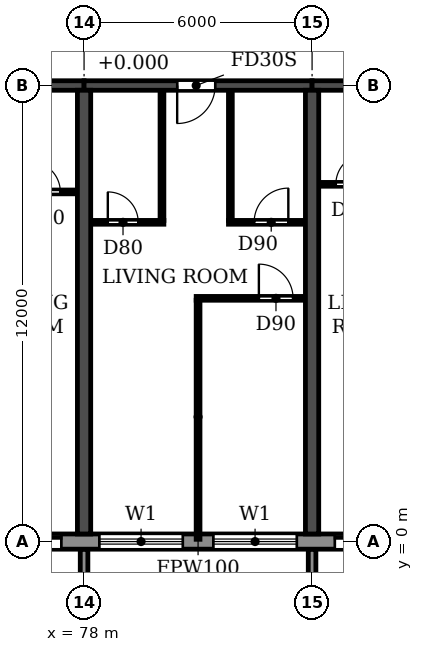
"""IFC4 building model, lengths in metres.
Left out: names, types, materials, properties, quantities, classifications, styles, units other than length and angle.
Written with IfcOpenShell. Run it as: python <this file> out.ifc"""

import sys

from ifc_helpers import new_model, si_unit, direction, frame, frame_2d, origin, place, context, subcontext, project, spatial, polyline, rectangle, outline, extrude, source, transform, mapped, element, fill, save


model = new_model("IFC4")
c1 = context("Model", 3, precision=1e-05, world=origin(), true_north=direction((0.0, 1.0)))
c2 = subcontext(c1, "Body", "Model", "MODEL_VIEW")
j1 = project(units=[si_unit("LENGTHUNIT", "METRE"), si_unit("PLANEANGLEUNIT", "RADIAN")], contexts=[c1])
p1 = place(None, origin())
s1 = spatial("IfcSite", under=j1, at=p1, CompositionType="ELEMENT")
p2 = place(p1, origin())
s2 = spatial("IfcBuilding", under=s1, at=p2, CompositionType="ELEMENT")
p3 = place(p2, frame((0.0, 0.0, 82.8)))
s3 = spatial("IfcBuildingStorey", under=s2, at=p3, CompositionType="ELEMENT", Elevation=82.8)
for number, where, z_axis, x_axis in (
    (1, (78.0, 0.2, 0.0), (0.0, 0.0, 1.0), (0.0, 1.0, 0.0)),
    (2, (84.0, 0.2, 0.0), (0.0, 0.0, 1.0), (0.0, 1.0, 0.0)),
):
    element("IfcWall", number, at=place(p3, frame(where, z_axis=z_axis, x_axis=x_axis)), inside=s3, PredefinedType="SHEAR", context=c2, shape_type="SweptSolid", body=[
        extrude(rectangle(XDim=11.675, YDim=0.35, at=frame_2d((5.837, 0.0))), origin(), (0.0, 0.0, 1.0), 3.06),
    ])
p4 = place(p3, frame((72.0, 12.0, 0.0), z_axis=(0.0, 0.0, 1.0), x_axis=(1.0, 0.0, 0.0)))
e3 = element("IfcWall", 3, at=p4, inside=s3, PredefinedType="SHEAR", context=c2, shape_type="SweptSolid", body=[
    extrude(rectangle(XDim=6.0, YDim=0.25, at=frame_2d((3.0, 0.0))), origin(), (0.0, 0.0, 1.0), 2.46),
])
p5 = place(p4, frame((2.55, 0.0, 0.0)))
e4 = element("IfcOpeningElement", 4, at=p5, cuts=e3, PredefinedType="OPENING", context=c2, shape_type="SweptSolid", body=[
    extrude(rectangle(XDim=1.0, YDim=2.1, at=frame_2d((0.5, 1.05))), frame((0.0, 0.135, 0.0), z_axis=(0.0, -1.0, 0.0), x_axis=(1.0, 0.0, 0.0)), (0.0, 0.0, 1.0), 0.27),
])
p6 = place(p3, frame((78.0, 12.0, 0.0), z_axis=(0.0, 0.0, 1.0), x_axis=(1.0, 0.0, 0.0)))
e5 = element("IfcWall", 5, at=p6, inside=s3, PredefinedType="SHEAR", context=c2, shape_type="SweptSolid", body=[
    extrude(rectangle(XDim=6.0, YDim=0.25, at=frame_2d((3.0, 0.0))), origin(), (0.0, 0.0, 1.0), 2.46),
])
p7 = place(p6, frame((2.45, 0.0, 0.0)))
e6 = element("IfcOpeningElement", 6, at=p7, cuts=e5, PredefinedType="OPENING", context=c2, shape_type="SweptSolid", body=[
    extrude(rectangle(XDim=1.0, YDim=2.1, at=frame_2d((0.5, 1.05))), frame((0.0, 0.135, 0.0), z_axis=(0.0, -1.0, 0.0), x_axis=(1.0, 0.0, 0.0)), (0.0, 0.0, 1.0), 0.27),
])
p8 = place(p3, frame((84.0, 12.0, 0.0), z_axis=(0.0, 0.0, 1.0), x_axis=(1.0, 0.0, 0.0)))
e7 = element("IfcWall", 7, at=p8, inside=s3, PredefinedType="SHEAR", context=c2, shape_type="SweptSolid", body=[
    extrude(rectangle(XDim=6.0, YDim=0.25, at=frame_2d((3.0, 0.0))), origin(), (0.0, 0.0, 1.0), 2.46),
])
p9 = place(p8, frame((2.45, 0.0, 0.0)))
e8 = element("IfcOpeningElement", 8, at=p9, cuts=e7, PredefinedType="OPENING", context=c2, shape_type="SweptSolid", body=[
    extrude(rectangle(XDim=1.0, YDim=2.1, at=frame_2d((0.5, 1.05))), frame((0.0, 0.135, 0.0), z_axis=(0.0, -1.0, 0.0), x_axis=(1.0, 0.0, 0.0)), (0.0, 0.0, 1.0), 0.27),
])
p10 = place(p3, frame((10.683, 0.0, 0.0), z_axis=(0.0, 0.0, 1.0), x_axis=(1.0, 0.0, 0.0)))
e9 = element("IfcWall", 9, at=p10, inside=s3, PredefinedType="STANDARD", context=c2, shape_type="SweptSolid", body=[
    extrude(rectangle(XDim=80.634, YDim=0.4, at=frame_2d((40.317, 0.0))), origin(), (0.0, 0.0, 1.0), 3.06),
])
p11 = place(p10, frame((1.717, 0.0, 0.9)))
e10 = element("IfcOpeningElement", 10, at=p11, cuts=e9, PredefinedType="OPENING", context=c2, shape_type="SweptSolid", body=[
    extrude(rectangle(XDim=2.2, YDim=1.5, at=frame_2d((1.1, 0.75))), frame((0.0, 0.21, 0.0), z_axis=(0.0, -1.0, 0.0), x_axis=(1.0, 0.0, 0.0)), (0.0, 0.0, 1.0), 0.42),
])
p12 = place(p10, frame((4.917, 0.0, 0.0)))
e11 = element("IfcOpeningElement", 11, at=p12, cuts=e9, PredefinedType="OPENING", context=c2, shape_type="SweptSolid", body=[
    extrude(rectangle(XDim=1.8, YDim=2.4, at=frame_2d((0.9, 1.2))), frame((0.0, 0.21, 0.0), z_axis=(0.0, -1.0, 0.0), x_axis=(1.0, 0.0, 0.0)), (0.0, 0.0, 1.0), 0.42),
])
p13 = place(p10, frame((7.717, 0.0, 0.9)))
e12 = element("IfcOpeningElement", 12, at=p13, cuts=e9, PredefinedType="OPENING", context=c2, shape_type="SweptSolid", body=[
    extrude(rectangle(XDim=2.2, YDim=1.5, at=frame_2d((1.1, 0.75))), frame((0.0, 0.21, 0.0), z_axis=(0.0, -1.0, 0.0), x_axis=(1.0, 0.0, 0.0)), (0.0, 0.0, 1.0), 0.42),
])
p14 = place(p10, frame((10.717, 0.0, 0.9)))
e13 = element("IfcOpeningElement", 13, at=p14, cuts=e9, PredefinedType="OPENING", context=c2, shape_type="SweptSolid", body=[
    extrude(rectangle(XDim=2.2, YDim=1.5, at=frame_2d((1.1, 0.75))), frame((0.0, 0.21, 0.0), z_axis=(0.0, -1.0, 0.0), x_axis=(1.0, 0.0, 0.0)), (0.0, 0.0, 1.0), 0.42),
])
p15 = place(p10, frame((13.917, 0.0, 0.0)))
e14 = element("IfcOpeningElement", 14, at=p15, cuts=e9, PredefinedType="OPENING", context=c2, shape_type="SweptSolid", body=[
    extrude(rectangle(XDim=1.8, YDim=2.4, at=frame_2d((0.9, 1.2))), frame((0.0, 0.21, 0.0), z_axis=(0.0, -1.0, 0.0), x_axis=(1.0, 0.0, 0.0)), (0.0, 0.0, 1.0), 0.42),
])
p16 = place(p10, frame((16.717, 0.0, 0.9)))
e15 = element("IfcOpeningElement", 15, at=p16, cuts=e9, PredefinedType="OPENING", context=c2, shape_type="SweptSolid", body=[
    extrude(rectangle(XDim=2.2, YDim=1.5, at=frame_2d((1.1, 0.75))), frame((0.0, 0.21, 0.0), z_axis=(0.0, -1.0, 0.0), x_axis=(1.0, 0.0, 0.0)), (0.0, 0.0, 1.0), 0.42),
])
p17 = place(p10, frame((19.717, 0.0, 0.9)))
e16 = element("IfcOpeningElement", 16, at=p17, cuts=e9, PredefinedType="OPENING", context=c2, shape_type="SweptSolid", body=[
    extrude(rectangle(XDim=2.2, YDim=1.5, at=frame_2d((1.1, 0.75))), frame((0.0, 0.21, 0.0), z_axis=(0.0, -1.0, 0.0), x_axis=(1.0, 0.0, 0.0)), (0.0, 0.0, 1.0), 0.42),
])
p18 = place(p10, frame((22.717, 0.0, 0.9)))
e17 = element("IfcOpeningElement", 17, at=p18, cuts=e9, PredefinedType="OPENING", context=c2, shape_type="SweptSolid", body=[
    extrude(rectangle(XDim=2.2, YDim=1.5, at=frame_2d((1.1, 0.75))), frame((0.0, 0.21, 0.0), z_axis=(0.0, -1.0, 0.0), x_axis=(1.0, 0.0, 0.0)), (0.0, 0.0, 1.0), 0.42),
])
p19 = place(p10, frame((25.917, 0.0, 0.0)))
e18 = element("IfcOpeningElement", 18, at=p19, cuts=e9, PredefinedType="OPENING", context=c2, shape_type="SweptSolid", body=[
    extrude(rectangle(XDim=1.8, YDim=2.4, at=frame_2d((0.9, 1.2))), frame((0.0, 0.21, 0.0), z_axis=(0.0, -1.0, 0.0), x_axis=(1.0, 0.0, 0.0)), (0.0, 0.0, 1.0), 0.42),
])
p20 = place(p10, frame((28.717, 0.0, 0.9)))
e19 = element("IfcOpeningElement", 19, at=p20, cuts=e9, PredefinedType="OPENING", context=c2, shape_type="SweptSolid", body=[
    extrude(rectangle(XDim=2.2, YDim=1.5, at=frame_2d((1.1, 0.75))), frame((0.0, 0.21, 0.0), z_axis=(0.0, -1.0, 0.0), x_axis=(1.0, 0.0, 0.0)), (0.0, 0.0, 1.0), 0.42),
])
p21 = place(p10, frame((31.717, 0.0, 0.9)))
e20 = element("IfcOpeningElement", 20, at=p21, cuts=e9, PredefinedType="OPENING", context=c2, shape_type="SweptSolid", body=[
    extrude(rectangle(XDim=2.2, YDim=1.5, at=frame_2d((1.1, 0.75))), frame((0.0, 0.21, 0.0), z_axis=(0.0, -1.0, 0.0), x_axis=(1.0, 0.0, 0.0)), (0.0, 0.0, 1.0), 0.42),
])
p22 = place(p10, frame((34.717, 0.0, 0.9)))
e21 = element("IfcOpeningElement", 21, at=p22, cuts=e9, PredefinedType="OPENING", context=c2, shape_type="SweptSolid", body=[
    extrude(rectangle(XDim=2.2, YDim=1.5, at=frame_2d((1.1, 0.75))), frame((0.0, 0.21, 0.0), z_axis=(0.0, -1.0, 0.0), x_axis=(1.0, 0.0, 0.0)), (0.0, 0.0, 1.0), 0.42),
])
p23 = place(p10, frame((37.717, 0.0, 0.9)))
e22 = element("IfcOpeningElement", 22, at=p23, cuts=e9, PredefinedType="OPENING", context=c2, shape_type="SweptSolid", body=[
    extrude(rectangle(XDim=2.2, YDim=1.5, at=frame_2d((1.1, 0.75))), frame((0.0, 0.21, 0.0), z_axis=(0.0, -1.0, 0.0), x_axis=(1.0, 0.0, 0.0)), (0.0, 0.0, 1.0), 0.42),
])
p24 = place(p10, frame((40.917, 0.0, 0.0)))
e23 = element("IfcOpeningElement", 23, at=p24, cuts=e9, PredefinedType="OPENING", context=c2, shape_type="SweptSolid", body=[
    extrude(rectangle(XDim=1.8, YDim=2.4, at=frame_2d((0.9, 1.2))), frame((0.0, 0.21, 0.0), z_axis=(0.0, -1.0, 0.0), x_axis=(1.0, 0.0, 0.0)), (0.0, 0.0, 1.0), 0.42),
])
p25 = place(p10, frame((43.717, 0.0, 0.9)))
e24 = element("IfcOpeningElement", 24, at=p25, cuts=e9, PredefinedType="OPENING", context=c2, shape_type="SweptSolid", body=[
    extrude(rectangle(XDim=2.2, YDim=1.5, at=frame_2d((1.1, 0.75))), frame((0.0, 0.21, 0.0), z_axis=(0.0, -1.0, 0.0), x_axis=(1.0, 0.0, 0.0)), (0.0, 0.0, 1.0), 0.42),
])
p26 = place(p10, frame((46.717, 0.0, 0.9)))
e25 = element("IfcOpeningElement", 25, at=p26, cuts=e9, PredefinedType="OPENING", context=c2, shape_type="SweptSolid", body=[
    extrude(rectangle(XDim=2.2, YDim=1.5, at=frame_2d((1.1, 0.75))), frame((0.0, 0.21, 0.0), z_axis=(0.0, -1.0, 0.0), x_axis=(1.0, 0.0, 0.0)), (0.0, 0.0, 1.0), 0.42),
])
p27 = place(p10, frame((49.717, 0.0, 0.9)))
e26 = element("IfcOpeningElement", 26, at=p27, cuts=e9, PredefinedType="OPENING", context=c2, shape_type="SweptSolid", body=[
    extrude(rectangle(XDim=2.2, YDim=1.5, at=frame_2d((1.1, 0.75))), frame((0.0, 0.21, 0.0), z_axis=(0.0, -1.0, 0.0), x_axis=(1.0, 0.0, 0.0)), (0.0, 0.0, 1.0), 0.42),
])
p28 = place(p10, frame((52.917, 0.0, 0.0)))
e27 = element("IfcOpeningElement", 27, at=p28, cuts=e9, PredefinedType="OPENING", context=c2, shape_type="SweptSolid", body=[
    extrude(rectangle(XDim=1.8, YDim=2.4, at=frame_2d((0.9, 1.2))), frame((0.0, 0.21, 0.0), z_axis=(0.0, -1.0, 0.0), x_axis=(1.0, 0.0, 0.0)), (0.0, 0.0, 1.0), 0.42),
])
p29 = place(p10, frame((55.717, 0.0, 0.9)))
e28 = element("IfcOpeningElement", 28, at=p29, cuts=e9, PredefinedType="OPENING", context=c2, shape_type="SweptSolid", body=[
    extrude(rectangle(XDim=2.2, YDim=1.5, at=frame_2d((1.1, 0.75))), frame((0.0, 0.21, 0.0), z_axis=(0.0, -1.0, 0.0), x_axis=(1.0, 0.0, 0.0)), (0.0, 0.0, 1.0), 0.42),
])
p30 = place(p10, frame((58.717, 0.0, 0.9)))
e29 = element("IfcOpeningElement", 29, at=p30, cuts=e9, PredefinedType="OPENING", context=c2, shape_type="SweptSolid", body=[
    extrude(rectangle(XDim=2.2, YDim=1.5, at=frame_2d((1.1, 0.75))), frame((0.0, 0.21, 0.0), z_axis=(0.0, -1.0, 0.0), x_axis=(1.0, 0.0, 0.0)), (0.0, 0.0, 1.0), 0.42),
])
p31 = place(p10, frame((61.717, 0.0, 0.9)))
e30 = element("IfcOpeningElement", 30, at=p31, cuts=e9, PredefinedType="OPENING", context=c2, shape_type="SweptSolid", body=[
    extrude(rectangle(XDim=2.2, YDim=1.5, at=frame_2d((1.1, 0.75))), frame((0.0, 0.21, 0.0), z_axis=(0.0, -1.0, 0.0), x_axis=(1.0, 0.0, 0.0)), (0.0, 0.0, 1.0), 0.42),
])
p32 = place(p10, frame((64.917, 0.0, 0.0)))
e31 = element("IfcOpeningElement", 31, at=p32, cuts=e9, PredefinedType="OPENING", context=c2, shape_type="SweptSolid", body=[
    extrude(rectangle(XDim=1.8, YDim=2.4, at=frame_2d((0.9, 1.2))), frame((0.0, 0.21, 0.0), z_axis=(0.0, -1.0, 0.0), x_axis=(1.0, 0.0, 0.0)), (0.0, 0.0, 1.0), 0.42),
])
p33 = place(p10, frame((67.717, 0.0, 0.9)))
e32 = element("IfcOpeningElement", 32, at=p33, cuts=e9, PredefinedType="OPENING", context=c2, shape_type="SweptSolid", body=[
    extrude(rectangle(XDim=2.2, YDim=1.5, at=frame_2d((1.1, 0.75))), frame((0.0, 0.21, 0.0), z_axis=(0.0, -1.0, 0.0), x_axis=(1.0, 0.0, 0.0)), (0.0, 0.0, 1.0), 0.42),
])
p34 = place(p10, frame((70.717, 0.0, 0.9)))
e33 = element("IfcOpeningElement", 33, at=p34, cuts=e9, PredefinedType="OPENING", context=c2, shape_type="SweptSolid", body=[
    extrude(rectangle(XDim=2.2, YDim=1.5, at=frame_2d((1.1, 0.75))), frame((0.0, 0.21, 0.0), z_axis=(0.0, -1.0, 0.0), x_axis=(1.0, 0.0, 0.0)), (0.0, 0.0, 1.0), 0.42),
])
p35 = place(p10, frame((73.917, 0.0, 0.0)))
e34 = element("IfcOpeningElement", 34, at=p35, cuts=e9, PredefinedType="OPENING", context=c2, shape_type="SweptSolid", body=[
    extrude(rectangle(XDim=1.8, YDim=2.4, at=frame_2d((0.9, 1.2))), frame((0.0, 0.21, 0.0), z_axis=(0.0, -1.0, 0.0), x_axis=(1.0, 0.0, 0.0)), (0.0, 0.0, 1.0), 0.42),
])
p36 = place(p10, frame((76.717, 0.0, 0.9)))
e35 = element("IfcOpeningElement", 35, at=p36, cuts=e9, PredefinedType="OPENING", context=c2, shape_type="SweptSolid", body=[
    extrude(rectangle(XDim=2.2, YDim=1.5, at=frame_2d((1.1, 0.75))), frame((0.0, 0.21, 0.0), z_axis=(0.0, -1.0, 0.0), x_axis=(1.0, 0.0, 0.0)), (0.0, 0.0, 1.0), 0.42),
])
m1 = source(origin(), c2, "Body", "SweptSolid", [
    extrude(outline(polyline([(0.0, 0.0), (0.2, 0.0), (0.2, 1.65), (0.0, 1.65), (0.0, 0.0)])), origin(), (0.0, 0.0, 1.0), 3.1),
])
for number, where in (
    (36, (77.9, -1.85, 0.0)),
    (37, (83.9, -1.85, 0.0)),
):
    element("IfcWall", number, at=place(p3, frame(where)), inside=s3, PredefinedType="STANDARD", context=c2, shape_type="MappedRepresentation", body=[
        mapped(m1, transform((0.0, 0.0, 0.0))),
    ])
p37 = place(p3, frame((80.95, 6.4, 0.0), z_axis=(0.0, 0.0, 1.0), x_axis=(1.0, 0.0, 0.0)))
e38 = element("IfcWall", 38, at=p37, inside=s3, PredefinedType="PARTITIONING", context=c2, shape_type="SweptSolid", body=[
    extrude(rectangle(XDim=2.865, YDim=0.1, at=frame_2d((1.433, 0.0))), origin(), (0.0, 0.0, 1.0), 3.06),
])
p38 = place(p37, frame((1.65, 0.0, 0.0)))
e39 = element("IfcOpeningElement", 39, at=p38, cuts=e38, PredefinedType="OPENING", context=c2, shape_type="SweptSolid", body=[
    extrude(rectangle(XDim=0.9, YDim=2.1, at=frame_2d((0.45, 1.05))), frame((0.0, 0.06, 0.0), z_axis=(0.0, -1.0, 0.0), x_axis=(1.0, 0.0, 0.0)), (0.0, 0.0, 1.0), 0.12),
])
p39 = place(p3, frame((78.185, 8.4, 0.0), z_axis=(0.0, 0.0, 1.0), x_axis=(1.0, 0.0, 0.0)))
e40 = element("IfcWall", 40, at=p39, inside=s3, PredefinedType="PARTITIONING", context=c2, shape_type="SweptSolid", body=[
    extrude(rectangle(XDim=1.915, YDim=0.1, at=frame_2d((0.958, 0.0))), origin(), (0.0, 0.0, 1.0), 3.06),
])
p40 = place(p39, frame((0.44, 0.0, 0.0)))
e41 = element("IfcOpeningElement", 41, at=p40, cuts=e40, PredefinedType="OPENING", context=c2, shape_type="SweptSolid", body=[
    extrude(rectangle(XDim=0.8, YDim=2.1, at=frame_2d((0.4, 1.05))), frame((0.0, 0.06, 0.0), z_axis=(0.0, -1.0, 0.0), x_axis=(1.0, 0.0, 0.0)), (0.0, 0.0, 1.0), 0.12),
])
p41 = place(p3, frame((81.8, 8.4, 0.0), z_axis=(0.0, 0.0, 1.0), x_axis=(1.0, 0.0, 0.0)))
e42 = element("IfcWall", 42, at=p41, inside=s3, PredefinedType="PARTITIONING", context=c2, shape_type="SweptSolid", body=[
    extrude(rectangle(XDim=2.015, YDim=0.1, at=frame_2d((1.007, 0.0))), origin(), (0.0, 0.0, 1.0), 3.06),
])
p42 = place(p41, frame((0.675, 0.0, 0.0)))
e43 = element("IfcOpeningElement", 43, at=p42, cuts=e42, PredefinedType="OPENING", context=c2, shape_type="SweptSolid", body=[
    extrude(rectangle(XDim=0.9, YDim=2.1, at=frame_2d((0.45, 1.05))), frame((0.0, 0.06, 0.0), z_axis=(0.0, -1.0, 0.0), x_axis=(1.0, 0.0, 0.0)), (0.0, 0.0, 1.0), 0.12),
])
p43 = place(p3, frame((75.9, 9.2, 0.0), z_axis=(0.0, 0.0, 1.0), x_axis=(1.0, 0.0, 0.0)))
e44 = element("IfcWall", 44, at=p43, inside=s3, PredefinedType="PARTITIONING", context=c2, shape_type="SweptSolid", body=[
    extrude(rectangle(XDim=1.915, YDim=0.1, at=frame_2d((0.958, 0.0))), origin(), (0.0, 0.0, 1.0), 3.06),
])
p44 = place(p43, frame((0.675, 0.0, 0.0)))
e45 = element("IfcOpeningElement", 45, at=p44, cuts=e44, PredefinedType="OPENING", context=c2, shape_type="SweptSolid", body=[
    extrude(rectangle(XDim=0.8, YDim=2.1, at=frame_2d((0.4, 1.05))), frame((0.0, 0.06, 0.0), z_axis=(0.0, -1.0, 0.0), x_axis=(1.0, 0.0, 0.0)), (0.0, 0.0, 1.0), 0.12),
])
p45 = place(p3, frame((84.185, 9.4, 0.0), z_axis=(0.0, 0.0, 1.0), x_axis=(1.0, 0.0, 0.0)))
e46 = element("IfcWall", 46, at=p45, inside=s3, PredefinedType="PARTITIONING", context=c2, shape_type="SweptSolid", body=[
    extrude(rectangle(XDim=1.915, YDim=0.1, at=frame_2d((0.958, 0.0))), origin(), (0.0, 0.0, 1.0), 3.06),
])
p46 = place(p45, frame((0.44, 0.0, 0.0)))
e47 = element("IfcOpeningElement", 47, at=p46, cuts=e46, PredefinedType="OPENING", context=c2, shape_type="SweptSolid", body=[
    extrude(rectangle(XDim=0.8, YDim=2.1, at=frame_2d((0.4, 1.05))), frame((0.0, 0.06, 0.0), z_axis=(0.0, -1.0, 0.0), x_axis=(1.0, 0.0, 0.0)), (0.0, 0.0, 1.0), 0.12),
])
p47 = place(p3, frame((80.05, 8.45, 0.0), z_axis=(0.0, 0.0, 1.0), x_axis=(0.0, 1.0, 0.0)))
e48 = element("IfcWall", 48, at=p47, inside=s3, PredefinedType="PARTITIONING", context=c2, shape_type="SweptSolid", body=[
    extrude(rectangle(XDim=3.415, YDim=0.1, at=frame_2d((1.708, 0.0))), origin(), (0.0, 0.0, 1.0), 3.06),
])
p48 = place(p3, frame((81.0, 0.06, 0.0), z_axis=(0.0, 0.0, 1.0), x_axis=(0.0, 1.0, 0.0)))
e49 = element("IfcWall", 49, at=p48, inside=s3, PredefinedType="PARTITIONING", context=c2, shape_type="SweptSolid", body=[
    extrude(rectangle(XDim=6.29, YDim=0.1, at=frame_2d((3.145, 0.0))), origin(), (0.0, 0.0, 1.0), 3.06),
])
p49 = place(p3, frame((81.85, 8.45, 0.0), z_axis=(0.0, 0.0, 1.0), x_axis=(0.0, 1.0, 0.0)))
e50 = element("IfcWall", 50, at=p49, inside=s3, PredefinedType="PARTITIONING", context=c2, shape_type="SweptSolid", body=[
    extrude(rectangle(XDim=3.415, YDim=0.1, at=frame_2d((1.708, 0.0))), origin(), (0.0, 0.0, 1.0), 3.06),
])
p50 = place(p32, origin())
e51 = element("IfcDoor", 51, at=p50, inside=s3, OperationType="DOUBLE_DOOR_SLIDING", PredefinedType="DOOR", context=c2, shape_type="SweptSolid", body=[
    extrude(rectangle(XDim=1.8, YDim=2.4, at=frame_2d((0.9, 1.2))), frame((0.0, 0.025, 0.0), z_axis=(0.0, -1.0, 0.0), x_axis=(1.0, 0.0, 0.0)), (0.0, 0.0, 1.0), 0.05),
])
fill(e31, e51)
p51 = place(p33, origin())
e52 = element("IfcWindow", 52, at=p51, inside=s3, PartitioningType="DOUBLE_PANEL_HORIZONTAL", PredefinedType="WINDOW", context=c2, shape_type="SweptSolid", body=[
    extrude(rectangle(XDim=2.2, YDim=1.5, at=frame_2d((1.1, 0.75))), frame((0.0, 0.03, 0.0), z_axis=(0.0, -1.0, 0.0), x_axis=(1.0, 0.0, 0.0)), (0.0, 0.0, 1.0), 0.06),
])
fill(e32, e52)
p52 = place(p34, origin())
e53 = element("IfcWindow", 53, at=p52, inside=s3, PartitioningType="DOUBLE_PANEL_HORIZONTAL", PredefinedType="WINDOW", context=c2, shape_type="SweptSolid", body=[
    extrude(rectangle(XDim=2.2, YDim=1.5, at=frame_2d((1.1, 0.75))), frame((0.0, 0.03, 0.0), z_axis=(0.0, -1.0, 0.0), x_axis=(1.0, 0.0, 0.0)), (0.0, 0.0, 1.0), 0.06),
])
fill(e33, e53)
p53 = place(p35, origin())
e54 = element("IfcDoor", 54, at=p53, inside=s3, OperationType="DOUBLE_DOOR_SLIDING", PredefinedType="DOOR", context=c2, shape_type="SweptSolid", body=[
    extrude(rectangle(XDim=1.8, YDim=2.4, at=frame_2d((0.9, 1.2))), frame((0.0, 0.025, 0.0), z_axis=(0.0, -1.0, 0.0), x_axis=(1.0, 0.0, 0.0)), (0.0, 0.0, 1.0), 0.05),
])
fill(e34, e54)
p54 = place(p44, origin())
e55 = element("IfcDoor", 55, at=p54, inside=s3, OperationType="SINGLE_SWING_LEFT", PredefinedType="DOOR", context=c2, shape_type="SweptSolid", body=[
    extrude(rectangle(XDim=0.8, YDim=2.1, at=frame_2d((0.4, 1.05))), frame((0.0, 0.025, 0.0), z_axis=(0.0, -1.0, 0.0), x_axis=(1.0, 0.0, 0.0)), (0.0, 0.0, 1.0), 0.05),
])
fill(e45, e55)
p55 = place(p40, origin())
e56 = element("IfcDoor", 56, at=p55, inside=s3, OperationType="SINGLE_SWING_LEFT", PredefinedType="DOOR", context=c2, shape_type="SweptSolid", body=[
    extrude(rectangle(XDim=0.8, YDim=2.1, at=frame_2d((0.4, 1.05))), frame((0.0, 0.025, 0.0), z_axis=(0.0, -1.0, 0.0), x_axis=(1.0, 0.0, 0.0)), (0.0, 0.0, 1.0), 0.05),
])
fill(e41, e56)
p56 = place(p7, frame((1.0, 0.0, 0.0), z_axis=(0.0, 0.0, 1.0), x_axis=(-1.0, 0.0, 0.0)))
e57 = element("IfcDoor", 57, at=p56, inside=s3, OperationType="SINGLE_SWING_RIGHT", PredefinedType="DOOR", context=c2, shape_type="SweptSolid", body=[
    extrude(rectangle(XDim=1.0, YDim=2.1, at=frame_2d((0.5, 1.05))), frame((0.0, 0.025, 0.0), z_axis=(0.0, -1.0, 0.0), x_axis=(1.0, 0.0, 0.0)), (0.0, 0.0, 1.0), 0.05),
])
fill(e6, e57)
p57 = place(p42, origin())
e58 = element("IfcDoor", 58, at=p57, inside=s3, OperationType="SINGLE_SWING_RIGHT", PredefinedType="DOOR", context=c2, shape_type="SweptSolid", body=[
    extrude(rectangle(XDim=0.9, YDim=2.1, at=frame_2d((0.45, 1.05))), frame((0.0, 0.025, 0.0), z_axis=(0.0, -1.0, 0.0), x_axis=(1.0, 0.0, 0.0)), (0.0, 0.0, 1.0), 0.05),
])
fill(e43, e58)
p58 = place(p38, origin())
e59 = element("IfcDoor", 59, at=p58, inside=s3, OperationType="SINGLE_SWING_LEFT", PredefinedType="DOOR", context=c2, shape_type="SweptSolid", body=[
    extrude(rectangle(XDim=0.9, YDim=2.1, at=frame_2d((0.45, 1.05))), frame((0.0, 0.025, 0.0), z_axis=(0.0, -1.0, 0.0), x_axis=(1.0, 0.0, 0.0)), (0.0, 0.0, 1.0), 0.05),
])
fill(e39, e59)
p59 = place(p46, origin())
e60 = element("IfcDoor", 60, at=p59, inside=s3, OperationType="SINGLE_SWING_RIGHT", PredefinedType="DOOR", context=c2, shape_type="SweptSolid", body=[
    extrude(rectangle(XDim=0.8, YDim=2.1, at=frame_2d((0.4, 1.05))), frame((0.0, 0.025, 0.0), z_axis=(0.0, -1.0, 0.0), x_axis=(1.0, 0.0, 0.0)), (0.0, 0.0, 1.0), 0.05),
])
fill(e47, e60)
save(model, sys.argv[1])
